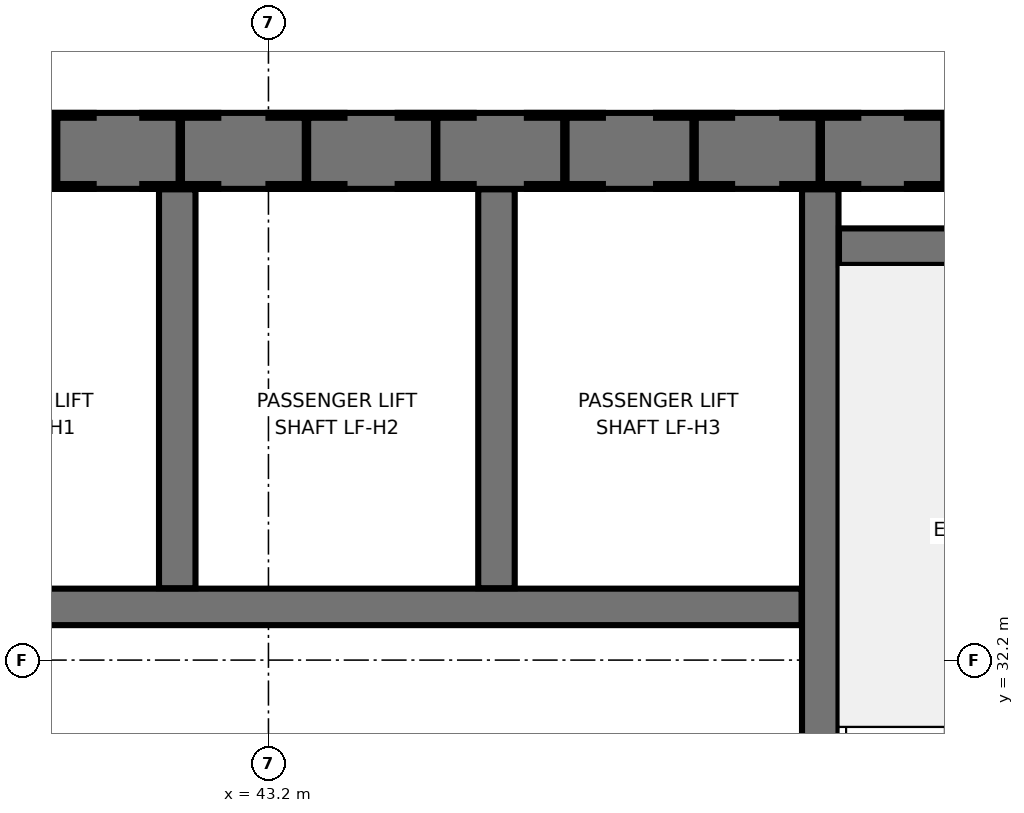
"""IFC4 building model, lengths in metres.
Left out: names, types, materials, properties, quantities, classifications, styles, units other than length and angle.
Written with IfcOpenShell. Run it as: python <this file> out.ifc"""

import sys

from ifc_helpers import new_model, si_unit, direction, frame, frame_2d, origin, origin_2d, place, context, subcontext, project, spatial, rectangle, i_section, extrude, element, save


model = new_model("IFC4")
c1 = context("Model", 3, precision=1e-05, world=origin(), true_north=direction((0.0, 1.0)))
c2 = subcontext(c1, "Body", "Model", "MODEL_VIEW")
j1 = project(units=[si_unit("LENGTHUNIT", "METRE"), si_unit("PLANEANGLEUNIT", "RADIAN")], contexts=[c1])
p1 = place(None, origin())
s1 = spatial("IfcSite", under=j1, at=p1, CompositionType="ELEMENT")
p2 = place(p1, origin())
s2 = spatial("IfcBuilding", under=s1, at=p2, CompositionType="ELEMENT")
p3 = place(p2, frame((0.0, 0.0, 72.3)))
s3 = spatial("IfcBuildingStorey", under=s2, at=p3, CompositionType="ELEMENT", Elevation=72.3)
for number, where, z_axis, x_axis in (
    (1, (41.8, 35.55, 0.0), (0.0, 0.0, 1.0), (1.0, 0.0, 0.0)),
    (2, (43.45, 35.55, 0.0), (0.0, 0.0, 1.0), (1.0, 0.0, 0.0)),
    (3, (45.15, 35.55, 0.0), (0.0, 0.0, 1.0), (1.0, 0.0, 0.0)),
    (4, (46.83, 35.55, 0.0), (0.0, 0.0, 1.0), (1.0, 0.0, 0.0)),
    (5, (42.62, 35.55, 0.0), (0.0, 0.0, 1.0), (1.0, 0.0, 0.0)),
    (6, (47.65, 35.55, 0.0), (0.0, 0.0, 1.0), (1.0, 0.0, 0.0)),
    (7, (44.3, 35.55, 0.0), (0.0, 0.0, 1.0), (1.0, 0.0, 0.0)),
    (8, (46.0, 35.55, 0.0), (0.0, 0.0, 1.0), (1.0, 0.0, 0.0)),
):
    element("IfcColumn", number, at=place(p3, frame(where, z_axis=z_axis, x_axis=x_axis)), inside=s3, PredefinedType="COLUMN", context=c2, shape_type="SweptSolid", body=[
        extrude(i_section(OverallWidth=0.5, OverallDepth=0.5, WebThickness=0.022, FlangeThickness=0.032, at=origin_2d()), origin(), (0.0, 0.0, 1.0), 4.5),
    ])
p4 = place(p3, frame((50.35, 35.55, 0.0), z_axis=(0.0, 0.0, 1.0), x_axis=(-1.0, 0.0, 0.0)))
e9 = element("IfcWall", 9, at=p4, inside=s3, PredefinedType="SHEAR", context=c2, shape_type="SweptSolid", body=[
    extrude(rectangle(XDim=28.7, YDim=0.5, at=frame_2d((14.35, 0.0))), origin(), (0.0, 0.0, 1.0), 4.5),
])
p5 = place(p3, frame((46.83, 27.003, 0.0), z_axis=(0.0, 0.0, 1.0), x_axis=(0.0, 1.0, 0.0)))
e10 = element("IfcWall", 10, at=p5, inside=s3, PredefinedType="SHEAR", context=c2, shape_type="SweptSolid", body=[
    extrude(rectangle(XDim=8.294, YDim=0.24, at=frame_2d((4.147, 0.0))), origin(), (0.0, 0.0, 1.0), 4.5),
])
p6 = place(p3, frame((46.953, 34.92, 0.0), z_axis=(0.0, 0.0, 1.0), x_axis=(1.0, 0.0, 0.0)))
e11 = element("IfcWall", 11, at=p6, inside=s3, PredefinedType="SHEAR", context=c2, shape_type="SweptSolid", body=[
    extrude(rectangle(XDim=2.994, YDim=0.24, at=frame_2d((1.497, 0.0))), origin(), (0.0, 0.0, 1.0), 4.5),
])
p7 = place(p3, frame((33.493, 32.55, 0.0), z_axis=(0.0, 0.0, 1.0), x_axis=(1.0, 0.0, 0.0)))
e12 = element("IfcWall", 12, at=p7, inside=s3, PredefinedType="SHEAR", context=c2, shape_type="SweptSolid", body=[
    extrude(rectangle(XDim=13.214, YDim=0.24, at=frame_2d((6.607, 0.0))), origin(), (0.0, 0.0, 1.0), 4.5),
])
p8 = place(p7, frame((0.447, 0.0, 0.0)))
e13 = element("IfcOpeningElement", 13, at=p8, cuts=e12, PredefinedType="OPENING", context=c2, shape_type="SweptSolid", body=[
    extrude(rectangle(XDim=1.12, YDim=2.0, at=frame_2d((0.56, 1.0))), frame((0.0, 0.13, 0.0), z_axis=(0.0, -1.0, 0.0), x_axis=(1.0, 0.0, 0.0)), (0.0, 0.0, 1.0), 0.26),
])
p9 = place(p7, frame((2.547, 0.0, 0.0)))
e14 = element("IfcOpeningElement", 14, at=p9, cuts=e12, PredefinedType="OPENING", context=c2, shape_type="SweptSolid", body=[
    extrude(rectangle(XDim=1.12, YDim=2.0, at=frame_2d((0.56, 1.0))), frame((0.0, 0.13, 0.0), z_axis=(0.0, -1.0, 0.0), x_axis=(1.0, 0.0, 0.0)), (0.0, 0.0, 1.0), 0.26),
])
p10 = place(p7, frame((4.647, 0.0, 0.0)))
e15 = element("IfcOpeningElement", 15, at=p10, cuts=e12, PredefinedType="OPENING", context=c2, shape_type="SweptSolid", body=[
    extrude(rectangle(XDim=1.12, YDim=2.0, at=frame_2d((0.56, 1.0))), frame((0.0, 0.13, 0.0), z_axis=(0.0, -1.0, 0.0), x_axis=(1.0, 0.0, 0.0)), (0.0, 0.0, 1.0), 0.26),
])
for number, where, z_axis, x_axis in (
    (16, (42.6, 32.673, 0.0), (0.0, 0.0, 1.0), (0.0, 1.0, 0.0)),
    (17, (44.7, 32.673, 0.0), (0.0, 0.0, 1.0), (0.0, 1.0, 0.0)),
):
    element("IfcWall", number, at=place(p3, frame(where, z_axis=z_axis, x_axis=x_axis)), inside=s3, PredefinedType="SHEAR", context=c2, shape_type="SweptSolid", body=[
        extrude(rectangle(XDim=2.624, YDim=0.24, at=frame_2d((1.312, 0.0))), origin(), (0.0, 0.0, 1.0), 4.5),
    ])
save(model, sys.argv[1])
